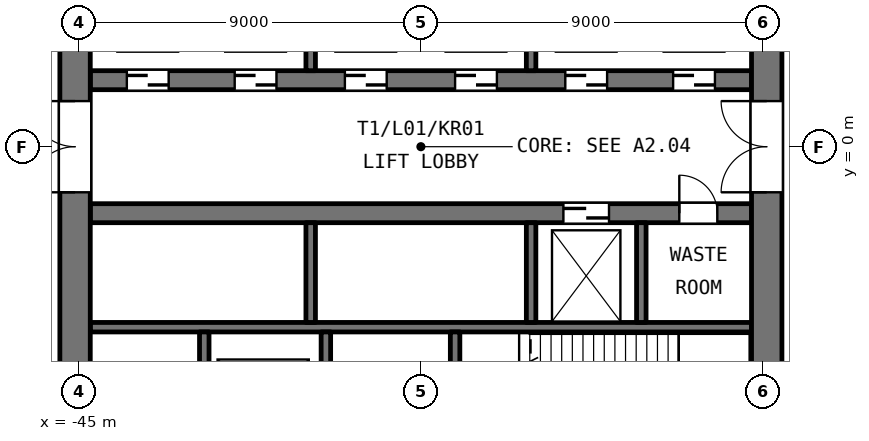
"""IFC4 building model, lengths in metres.
Left out: names, types, materials, properties, quantities, classifications, styles, units other than length and angle.
Written with IfcOpenShell. Run it as: python <this file> out.ifc"""

import sys

from ifc_helpers import new_model, si_unit, direction, frame, frame_2d, origin, place, context, subcontext, project, spatial, rectangle, extrude, element, fill, save


model = new_model("IFC4")
c1 = context("Model", 3, precision=1e-05, world=origin(), true_north=direction((0.0, 1.0)))
c2 = subcontext(c1, "Body", "Model", "MODEL_VIEW")
j1 = project(units=[si_unit("LENGTHUNIT", "METRE"), si_unit("PLANEANGLEUNIT", "RADIAN")], contexts=[c1])
p1 = place(None, origin())
s1 = spatial("IfcSite", under=j1, at=p1, CompositionType="ELEMENT")
p2 = place(p1, origin())
s2 = spatial("IfcBuilding", under=s1, at=p2, CompositionType="ELEMENT")
p3 = place(p2, frame((0.0, 0.0, 7.2)))
s3 = spatial("IfcBuildingStorey", under=s2, at=p3, CompositionType="ELEMENT", Elevation=7.2)
p4 = place(p3, frame((-44.7, -4.75, 0.0), z_axis=(0.0, 0.0, 1.0), x_axis=(1.0, 0.0, 0.0)))
e1 = element("IfcWall", 1, at=p4, inside=s3, PredefinedType="SHEAR", context=c2, shape_type="SweptSolid", body=[
    extrude(rectangle(XDim=17.4, YDim=0.25, at=frame_2d((8.7, 0.0))), origin(), (0.0, 0.0, 1.0), 5.1),
])
p5 = place(p3, frame((-44.7, -1.75, 0.0), z_axis=(0.0, 0.0, 1.0), x_axis=(1.0, 0.0, 0.0)))
e2 = element("IfcWall", 2, at=p5, inside=s3, PredefinedType="SHEAR", context=c2, shape_type="SweptSolid", body=[
    extrude(rectangle(XDim=17.4, YDim=0.5, at=frame_2d((8.7, 0.0))), origin(), (0.0, 0.0, 1.0), 5.1),
])
p6 = place(p5, frame((12.45, 0.0, 0.0)))
e3 = element("IfcOpeningElement", 3, at=p6, cuts=e2, PredefinedType="OPENING", context=c2, shape_type="SweptSolid", body=[
    extrude(rectangle(XDim=1.2, YDim=2.1, at=frame_2d((0.6, 1.05))), frame((0.0, 0.26, 0.0), z_axis=(0.0, -1.0, 0.0), x_axis=(1.0, 0.0, 0.0)), (0.0, 0.0, 1.0), 0.52),
])
p7 = place(p5, frame((15.5, 0.0, 0.0)))
e4 = element("IfcOpeningElement", 4, at=p7, cuts=e2, PredefinedType="OPENING", context=c2, shape_type="SweptSolid", body=[
    extrude(rectangle(XDim=1.0, YDim=2.1, at=frame_2d((0.5, 1.05))), frame((0.0, 0.26, 0.0), z_axis=(0.0, -1.0, 0.0), x_axis=(1.0, 0.0, 0.0)), (0.0, 0.0, 1.0), 0.52),
])
p8 = place(p3, frame((-44.7, 1.75, 0.0), z_axis=(0.0, 0.0, 1.0), x_axis=(1.0, 0.0, 0.0)))
e5 = element("IfcWall", 5, at=p8, inside=s3, PredefinedType="SHEAR", context=c2, shape_type="SweptSolid", body=[
    extrude(rectangle(XDim=17.4, YDim=0.5, at=frame_2d((8.7, 0.0))), origin(), (0.0, 0.0, 1.0), 5.1),
])
p9 = place(p8, frame((0.962, 0.0, 0.0)))
e6 = element("IfcOpeningElement", 6, at=p9, cuts=e5, PredefinedType="OPENING", context=c2, shape_type="SweptSolid", body=[
    extrude(rectangle(XDim=1.1, YDim=2.1, at=frame_2d((0.55, 1.05))), frame((0.0, 0.26, 0.0), z_axis=(0.0, -1.0, 0.0), x_axis=(1.0, 0.0, 0.0)), (0.0, 0.0, 1.0), 0.52),
])
p10 = place(p8, frame((3.8, 0.0, 0.0)))
e7 = element("IfcOpeningElement", 7, at=p10, cuts=e5, PredefinedType="OPENING", context=c2, shape_type="SweptSolid", body=[
    extrude(rectangle(XDim=1.1, YDim=2.1, at=frame_2d((0.55, 1.05))), frame((0.0, 0.26, 0.0), z_axis=(0.0, -1.0, 0.0), x_axis=(1.0, 0.0, 0.0)), (0.0, 0.0, 1.0), 0.52),
])
p11 = place(p8, frame((6.7, 0.0, 0.0)))
e8 = element("IfcOpeningElement", 8, at=p11, cuts=e5, PredefinedType="OPENING", context=c2, shape_type="SweptSolid", body=[
    extrude(rectangle(XDim=1.1, YDim=2.1, at=frame_2d((0.55, 1.05))), frame((0.0, 0.26, 0.0), z_axis=(0.0, -1.0, 0.0), x_axis=(1.0, 0.0, 0.0)), (0.0, 0.0, 1.0), 0.52),
])
p12 = place(p8, frame((9.6, 0.0, 0.0)))
e9 = element("IfcOpeningElement", 9, at=p12, cuts=e5, PredefinedType="OPENING", context=c2, shape_type="SweptSolid", body=[
    extrude(rectangle(XDim=1.1, YDim=2.1, at=frame_2d((0.55, 1.05))), frame((0.0, 0.26, 0.0), z_axis=(0.0, -1.0, 0.0), x_axis=(1.0, 0.0, 0.0)), (0.0, 0.0, 1.0), 0.52),
])
p13 = place(p8, frame((12.5, 0.0, 0.0)))
e10 = element("IfcOpeningElement", 10, at=p13, cuts=e5, PredefinedType="OPENING", context=c2, shape_type="SweptSolid", body=[
    extrude(rectangle(XDim=1.1, YDim=2.1, at=frame_2d((0.55, 1.05))), frame((0.0, 0.26, 0.0), z_axis=(0.0, -1.0, 0.0), x_axis=(1.0, 0.0, 0.0)), (0.0, 0.0, 1.0), 0.52),
])
p14 = place(p8, frame((15.337, 0.0, 0.0)))
e11 = element("IfcOpeningElement", 11, at=p14, cuts=e5, PredefinedType="OPENING", context=c2, shape_type="SweptSolid", body=[
    extrude(rectangle(XDim=1.1, YDim=2.1, at=frame_2d((0.55, 1.05))), frame((0.0, 0.26, 0.0), z_axis=(0.0, -1.0, 0.0), x_axis=(1.0, 0.0, 0.0)), (0.0, 0.0, 1.0), 0.52),
])
p15 = place(p3, frame((-45.1, -9.5, 0.0), z_axis=(0.0, 0.0, 1.0), x_axis=(0.0, 1.0, 0.0)))
e12 = element("IfcWall", 12, at=p15, inside=s3, PredefinedType="SHEAR", context=c2, shape_type="SweptSolid", body=[
    extrude(rectangle(XDim=19.0, YDim=0.8, at=frame_2d((9.5, 0.0))), origin(), (0.0, 0.0, 1.0), 5.1),
])
p16 = place(p15, frame((8.3, 0.0, 0.0)))
e13 = element("IfcOpeningElement", 13, at=p16, cuts=e12, PredefinedType="OPENING", context=c2, shape_type="SweptSolid", body=[
    extrude(rectangle(XDim=2.4, YDim=2.1, at=frame_2d((1.2, 1.05))), frame((0.0, 0.41, 0.0), z_axis=(0.0, -1.0, 0.0), x_axis=(1.0, 0.0, 0.0)), (0.0, 0.0, 1.0), 0.82),
])
p17 = place(p3, frame((-41.7, -8.7, 0.0), z_axis=(0.0, 0.0, 1.0), x_axis=(0.0, 1.0, 0.0)))
e14 = element("IfcWall", 14, at=p17, inside=s3, PredefinedType="SHEAR", context=c2, shape_type="SweptSolid", body=[
    extrude(rectangle(XDim=3.825, YDim=0.25, at=frame_2d((1.913, 0.0))), origin(), (0.0, 0.0, 1.0), 5.1),
])
for number, where, z_axis, x_axis in (
    (15, (-38.9, -4.625, 0.0), (0.0, 0.0, 1.0), (0.0, 1.0, 0.0)),
    (16, (-38.9, 2.0, 0.0), (0.0, 0.0, 1.0), (0.0, 1.0, 0.0)),
):
    element("IfcWall", number, at=place(p3, frame(where, z_axis=z_axis, x_axis=x_axis)), inside=s3, PredefinedType="SHEAR", context=c2, shape_type="SweptSolid", body=[
        extrude(rectangle(XDim=2.625, YDim=0.25, at=frame_2d((1.312, 0.0))), origin(), (0.0, 0.0, 1.0), 5.1),
    ])
p18 = place(p3, frame((-38.5, -8.7, 0.0), z_axis=(0.0, 0.0, 1.0), x_axis=(0.0, 1.0, 0.0)))
e17 = element("IfcWall", 17, at=p18, inside=s3, PredefinedType="SHEAR", context=c2, shape_type="SweptSolid", body=[
    extrude(rectangle(XDim=3.825, YDim=0.25, at=frame_2d((1.913, 0.0))), origin(), (0.0, 0.0, 1.0), 5.1),
])
p19 = place(p18, frame((1.6, 0.0, 0.0)))
e18 = element("IfcOpeningElement", 18, at=p19, cuts=e17, PredefinedType="OPENING", context=c2, shape_type="SweptSolid", body=[
    extrude(rectangle(XDim=1.2, YDim=2.1, at=frame_2d((0.6, 1.05))), frame((0.0, 0.135, 0.0), z_axis=(0.0, -1.0, 0.0), x_axis=(1.0, 0.0, 0.0)), (0.0, 0.0, 1.0), 0.27),
])
p20 = place(p3, frame((-35.1, -8.7, 0.0), z_axis=(0.0, 0.0, 1.0), x_axis=(0.0, 1.0, 0.0)))
e19 = element("IfcWall", 19, at=p20, inside=s3, PredefinedType="SHEAR", context=c2, shape_type="SweptSolid", body=[
    extrude(rectangle(XDim=3.825, YDim=0.25, at=frame_2d((1.913, 0.0))), origin(), (0.0, 0.0, 1.0), 5.1),
])
p21 = place(p20, frame((1.3, 0.0, 0.0)))
e20 = element("IfcOpeningElement", 20, at=p21, cuts=e19, PredefinedType="OPENING", context=c2, shape_type="SweptSolid", body=[
    extrude(rectangle(XDim=1.2, YDim=2.1, at=frame_2d((0.6, 1.05))), frame((0.0, 0.135, 0.0), z_axis=(0.0, -1.0, 0.0), x_axis=(1.0, 0.0, 0.0)), (0.0, 0.0, 1.0), 0.27),
])
for number, where, z_axis, x_axis in (
    (21, (-33.1, -4.625, 0.0), (0.0, 0.0, 1.0), (0.0, 1.0, 0.0)),
    (22, (-33.1, 2.0, 0.0), (0.0, 0.0, 1.0), (0.0, 1.0, 0.0)),
    (23, (-30.2, -4.625, 0.0), (0.0, 0.0, 1.0), (0.0, 1.0, 0.0)),
):
    element("IfcWall", number, at=place(p3, frame(where, z_axis=z_axis, x_axis=x_axis)), inside=s3, PredefinedType="SHEAR", context=c2, shape_type="SweptSolid", body=[
        extrude(rectangle(XDim=2.625, YDim=0.25, at=frame_2d((1.312, 0.0))), origin(), (0.0, 0.0, 1.0), 5.1),
    ])
p22 = place(p3, frame((-26.9, -9.5, 0.0), z_axis=(0.0, 0.0, 1.0), x_axis=(0.0, 1.0, 0.0)))
e24 = element("IfcWall", 24, at=p22, inside=s3, PredefinedType="SHEAR", context=c2, shape_type="SweptSolid", body=[
    extrude(rectangle(XDim=19.0, YDim=0.8, at=frame_2d((9.5, 0.0))), origin(), (0.0, 0.0, 1.0), 5.1),
])
p23 = place(p22, frame((8.3, 0.0, 0.0)))
e25 = element("IfcOpeningElement", 25, at=p23, cuts=e24, PredefinedType="OPENING", context=c2, shape_type="SweptSolid", body=[
    extrude(rectangle(XDim=2.4, YDim=2.1, at=frame_2d((1.2, 1.05))), frame((0.0, 0.41, 0.0), z_axis=(0.0, -1.0, 0.0), x_axis=(1.0, 0.0, 0.0)), (0.0, 0.0, 1.0), 0.82),
])
p24 = place(p16, origin())
e26 = element("IfcDoor", 26, at=p24, inside=s3, OperationType="DOUBLE_DOOR_SINGLE_SWING", PredefinedType="DOOR", context=c2, shape_type="SweptSolid", body=[
    extrude(rectangle(XDim=2.4, YDim=2.1, at=frame_2d((1.2, 1.05))), frame((0.0, -0.225, 0.0), z_axis=(0.0, -1.0, 0.0), x_axis=(1.0, 0.0, 0.0)), (0.0, 0.0, 1.0), 0.05),
])
fill(e13, e26)
p25 = place(p23, origin())
e27 = element("IfcDoor", 27, at=p25, inside=s3, OperationType="DOUBLE_DOOR_SINGLE_SWING", PredefinedType="DOOR", context=c2, shape_type="SweptSolid", body=[
    extrude(rectangle(XDim=2.4, YDim=2.1, at=frame_2d((1.2, 1.05))), frame((0.0, 0.275, 0.0), z_axis=(0.0, -1.0, 0.0), x_axis=(1.0, 0.0, 0.0)), (0.0, 0.0, 1.0), 0.05),
])
fill(e25, e27)
p26 = place(p9, origin())
e28 = element("IfcDoor", 28, at=p26, inside=s3, OperationType="SLIDING_TO_LEFT", PredefinedType="DOOR", context=c2, shape_type="SweptSolid", body=[
    extrude(rectangle(XDim=1.1, YDim=2.1, at=frame_2d((0.55, 1.05))), frame((0.0, 0.025, 0.0), z_axis=(0.0, -1.0, 0.0), x_axis=(1.0, 0.0, 0.0)), (0.0, 0.0, 1.0), 0.05),
])
fill(e6, e28)
p27 = place(p10, origin())
e29 = element("IfcDoor", 29, at=p27, inside=s3, OperationType="SLIDING_TO_LEFT", PredefinedType="DOOR", context=c2, shape_type="SweptSolid", body=[
    extrude(rectangle(XDim=1.1, YDim=2.1, at=frame_2d((0.55, 1.05))), frame((0.0, 0.025, 0.0), z_axis=(0.0, -1.0, 0.0), x_axis=(1.0, 0.0, 0.0)), (0.0, 0.0, 1.0), 0.05),
])
fill(e7, e29)
p28 = place(p11, origin())
e30 = element("IfcDoor", 30, at=p28, inside=s3, OperationType="SLIDING_TO_LEFT", PredefinedType="DOOR", context=c2, shape_type="SweptSolid", body=[
    extrude(rectangle(XDim=1.1, YDim=2.1, at=frame_2d((0.55, 1.05))), frame((0.0, 0.025, 0.0), z_axis=(0.0, -1.0, 0.0), x_axis=(1.0, 0.0, 0.0)), (0.0, 0.0, 1.0), 0.05),
])
fill(e8, e30)
p29 = place(p12, origin())
e31 = element("IfcDoor", 31, at=p29, inside=s3, OperationType="SLIDING_TO_LEFT", PredefinedType="DOOR", context=c2, shape_type="SweptSolid", body=[
    extrude(rectangle(XDim=1.1, YDim=2.1, at=frame_2d((0.55, 1.05))), frame((0.0, 0.025, 0.0), z_axis=(0.0, -1.0, 0.0), x_axis=(1.0, 0.0, 0.0)), (0.0, 0.0, 1.0), 0.05),
])
fill(e9, e31)
p30 = place(p13, origin())
e32 = element("IfcDoor", 32, at=p30, inside=s3, OperationType="SLIDING_TO_LEFT", PredefinedType="DOOR", context=c2, shape_type="SweptSolid", body=[
    extrude(rectangle(XDim=1.1, YDim=2.1, at=frame_2d((0.55, 1.05))), frame((0.0, 0.025, 0.0), z_axis=(0.0, -1.0, 0.0), x_axis=(1.0, 0.0, 0.0)), (0.0, 0.0, 1.0), 0.05),
])
fill(e10, e32)
p31 = place(p14, origin())
e33 = element("IfcDoor", 33, at=p31, inside=s3, OperationType="SLIDING_TO_LEFT", PredefinedType="DOOR", context=c2, shape_type="SweptSolid", body=[
    extrude(rectangle(XDim=1.1, YDim=2.1, at=frame_2d((0.55, 1.05))), frame((0.0, 0.025, 0.0), z_axis=(0.0, -1.0, 0.0), x_axis=(1.0, 0.0, 0.0)), (0.0, 0.0, 1.0), 0.05),
])
fill(e11, e33)
p32 = place(p6, origin())
e34 = element("IfcDoor", 34, at=p32, inside=s3, OperationType="SLIDING_TO_LEFT", PredefinedType="DOOR", context=c2, shape_type="SweptSolid", body=[
    extrude(rectangle(XDim=1.2, YDim=2.1, at=frame_2d((0.6, 1.05))), frame((0.0, 0.025, 0.0), z_axis=(0.0, -1.0, 0.0), x_axis=(1.0, 0.0, 0.0)), (0.0, 0.0, 1.0), 0.05),
])
fill(e3, e34)
p33 = place(p7, origin())
e35 = element("IfcDoor", 35, at=p33, inside=s3, OperationType="SINGLE_SWING_LEFT", PredefinedType="DOOR", context=c2, shape_type="SweptSolid", body=[
    extrude(rectangle(XDim=1.0, YDim=2.1, at=frame_2d((0.5, 1.05))), frame((0.0, 0.025, 0.0), z_axis=(0.0, -1.0, 0.0), x_axis=(1.0, 0.0, 0.0)), (0.0, 0.0, 1.0), 0.05),
])
fill(e4, e35)
save(model, sys.argv[1])
